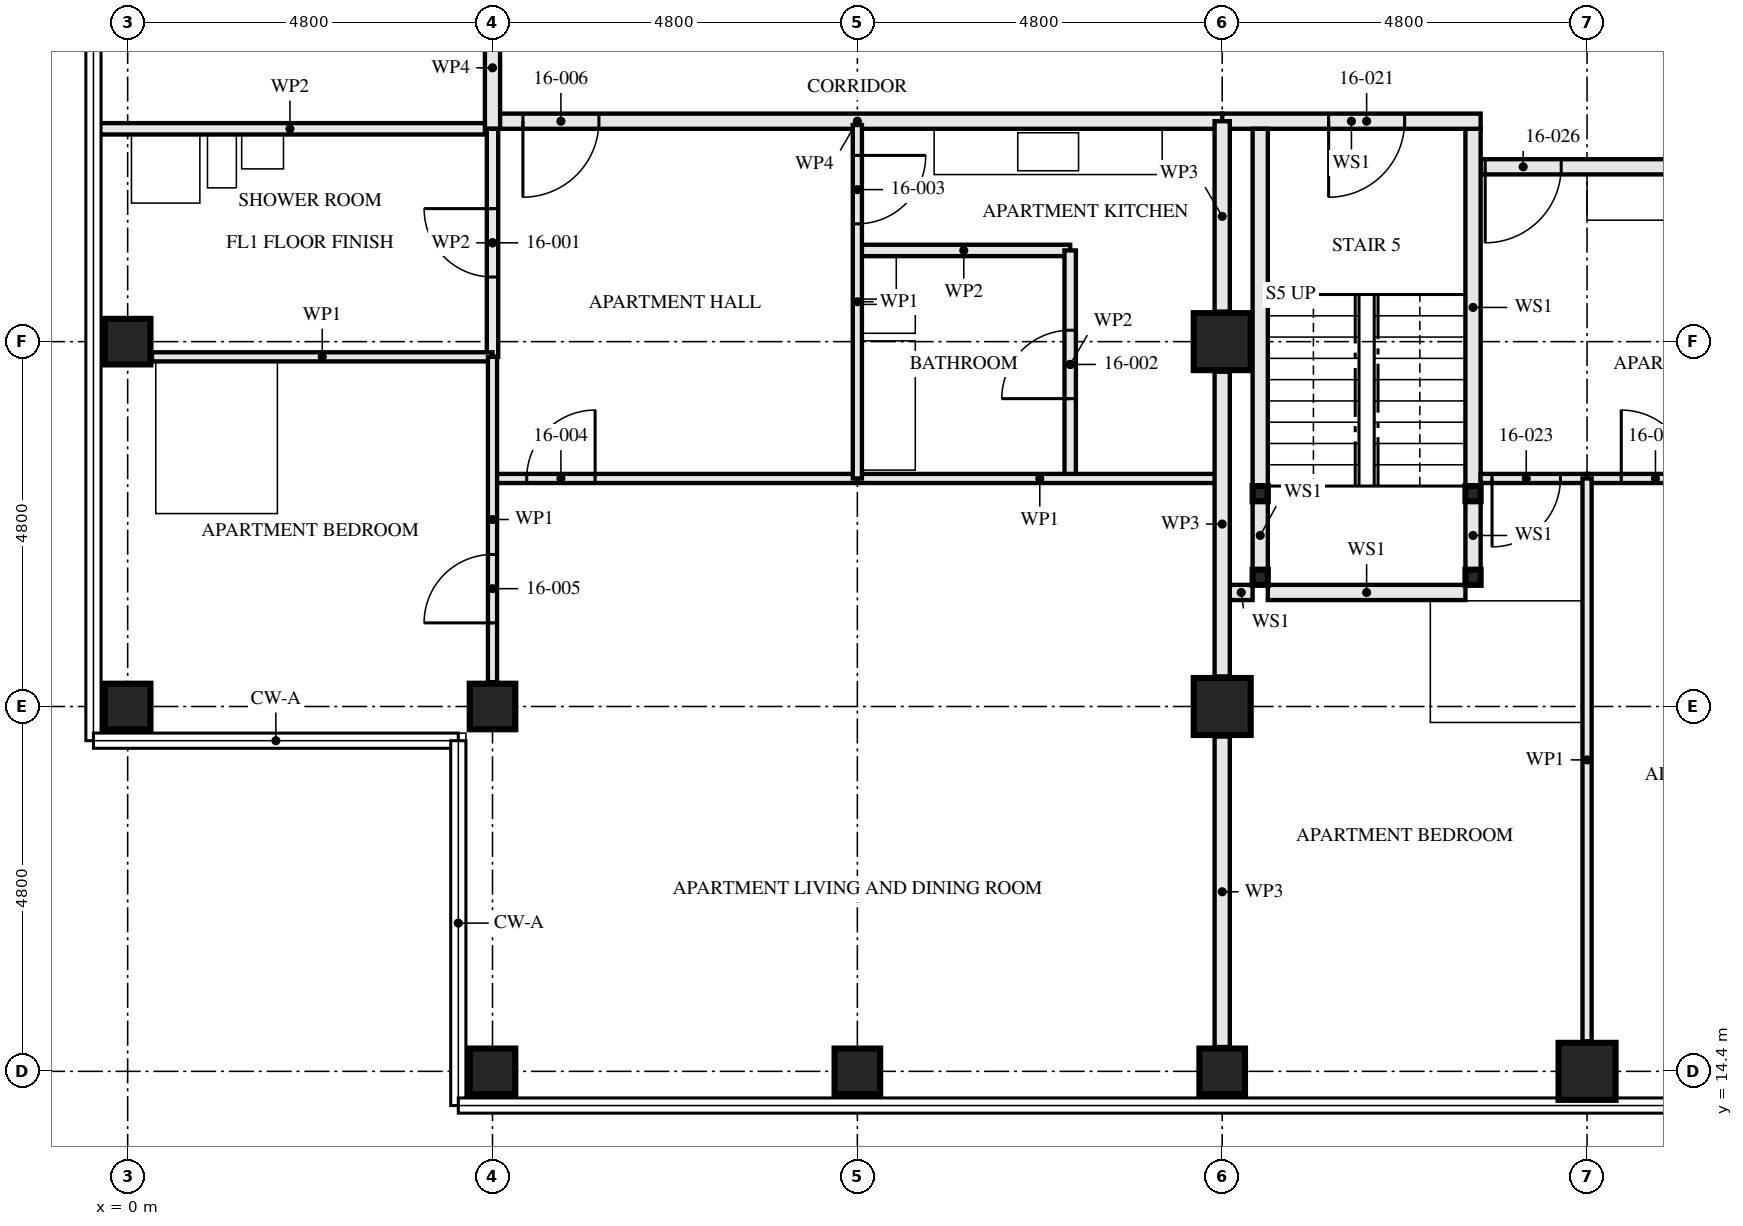
"""IFC4 building model, lengths in metres.
Left out: names, types, materials, properties, quantities, classifications, styles, units other than length and angle.
Written with IfcOpenShell. Run it as: python <this file> out.ifc"""

import sys

from ifc_helpers import new_model, si_unit, direction, frame, frame_2d, origin, origin_2d, place, context, subcontext, project, spatial, rectangle, hollow_rectangle, extrude, element, fill, save


model = new_model("IFC4")
c1 = context("Model", 3, precision=1e-05, world=origin(), true_north=direction((0.0, 1.0)))
c2 = subcontext(c1, "Body", "Model", "MODEL_VIEW")
j1 = project(units=[si_unit("LENGTHUNIT", "METRE"), si_unit("PLANEANGLEUNIT", "RADIAN")], contexts=[c1])
p1 = place(None, origin())
s1 = spatial("IfcSite", under=j1, at=p1, CompositionType="ELEMENT")
p2 = place(p1, origin())
s2 = spatial("IfcBuilding", under=s1, at=p2, CompositionType="ELEMENT")
p3 = place(p2, frame((0.0, 0.0, 62.0)))
s3 = spatial("IfcBuildingStorey", under=s2, at=p3, CompositionType="ELEMENT", Elevation=62.0)
for number, where, z_axis, x_axis in (
    (1, (0.0, 19.2, 0.0), (0.0, 0.0, 1.0), (0.0, 1.0, 0.0)),
    (2, (0.0, 24.0, 0.0), (0.0, 0.0, 1.0), (1.0, 0.0, 0.0)),
    (3, (4.8, 14.4, 0.0), (0.0, 0.0, 1.0), (0.0, 1.0, 0.0)),
    (4, (4.8, 19.2, 0.0), (0.0, 0.0, 1.0), (0.0, 1.0, 0.0)),
    (5, (9.6, 14.4, 0.0), (0.0, 0.0, 1.0), (0.0, 1.0, 0.0)),
    (6, (14.4, 14.4, 0.0), (0.0, 0.0, 1.0), (0.0, 1.0, 0.0)),
):
    element("IfcColumn", number, at=place(p3, frame(where, z_axis=z_axis, x_axis=x_axis)), inside=s3, PredefinedType="COLUMN", context=c2, shape_type="SweptSolid", body=[
        extrude(hollow_rectangle(XDim=0.6, YDim=0.6, WallThickness=0.08, at=origin_2d()), origin(), (0.0, 0.0, 1.0), 3.5),
    ])
for number, where, z_axis, x_axis in (
    (7, (14.4, 19.2, 0.0), (0.0, 0.0, 1.0), (1.0, 0.0, 0.0)),
    (8, (14.4, 24.0, 0.0), (0.0, 0.0, 1.0), (1.0, 0.0, 0.0)),
    (9, (19.2, 14.4, 0.0), (0.0, 0.0, 1.0), (0.0, 1.0, 0.0)),
):
    element("IfcColumn", number, at=place(p3, frame(where, z_axis=z_axis, x_axis=x_axis)), inside=s3, PredefinedType="COLUMN", context=c2, shape_type="SweptSolid", body=[
        extrude(hollow_rectangle(XDim=0.75, YDim=0.75, WallThickness=0.08, at=origin_2d()), origin(), (0.0, 0.0, 1.0), 3.5),
    ])
for number, where, z_axis, x_axis in (
    (10, (14.9, 20.9, 0.0), (0.0, 0.0, 1.0), (1.0, 0.0, 0.0)),
    (11, (17.7, 20.9, 0.0), (0.0, 0.0, 1.0), (1.0, 0.0, 0.0)),
    (12, (14.9, 22.0, 0.0), (0.0, 0.0, 1.0), (1.0, 0.0, 0.0)),
    (13, (17.7, 22.0, 0.0), (0.0, 0.0, 1.0), (1.0, 0.0, 0.0)),
):
    element("IfcColumn", number, at=place(p3, frame(where, z_axis=z_axis, x_axis=x_axis)), inside=s3, PredefinedType="COLUMN", context=c2, shape_type="SweptSolid", body=[
        extrude(hollow_rectangle(XDim=0.2, YDim=0.2, WallThickness=0.008, at=origin_2d()), origin(), (0.0, 0.0, 1.0), 3.33),
    ])
p4 = place(p3, frame((4.8, 23.8, 0.0), z_axis=(0.0, 0.0, 1.0), x_axis=(0.0, 1.0, 0.0)))
e14 = element("IfcWall", 14, at=p4, inside=s3, PredefinedType="PARTITIONING", context=c2, shape_type="SweptSolid", body=[
    extrude(rectangle(XDim=3.0, YDim=0.15, at=frame_2d((1.5, 0.0))), origin(), (0.0, 0.0, 1.0), 2.55),
])
p5 = place(p4, frame((1.05, 0.0, 0.0)))
e15 = element("IfcOpeningElement", 15, at=p5, cuts=e14, PredefinedType="OPENING", context=c2, shape_type="SweptSolid", body=[
    extrude(rectangle(XDim=0.9, YDim=2.1, at=frame_2d((0.45, 1.05))), frame((0.0, 0.085, 0.0), z_axis=(0.0, -1.0, 0.0), x_axis=(1.0, 0.0, 0.0)), (0.0, 0.0, 1.0), 0.171),
])
p6 = place(p3, frame((12.4, 22.2, 0.0), z_axis=(0.0, 0.0, 1.0), x_axis=(0.0, 1.0, 0.0)))
e16 = element("IfcWall", 16, at=p6, inside=s3, PredefinedType="PARTITIONING", context=c2, shape_type="SweptSolid", body=[
    extrude(rectangle(XDim=3.0, YDim=0.15, at=frame_2d((1.5, 0.0))), origin(), (0.0, 0.0, 1.0), 2.55),
])
p7 = place(p6, frame((1.05, 0.0, 0.0)))
e17 = element("IfcOpeningElement", 17, at=p7, cuts=e16, PredefinedType="OPENING", context=c2, shape_type="SweptSolid", body=[
    extrude(rectangle(XDim=0.9, YDim=2.1, at=frame_2d((0.45, 1.05))), frame((0.0, 0.085, 0.0), z_axis=(0.0, -1.0, 0.0), x_axis=(1.0, 0.0, 0.0)), (0.0, 0.0, 1.0), 0.171),
])
p8 = place(p3, frame((9.6, 25.2, 0.0), z_axis=(0.0, 0.0, 1.0), x_axis=(1.0, 0.0, 0.0)))
e18 = element("IfcWall", 18, at=p8, inside=s3, PredefinedType="PARTITIONING", context=c2, shape_type="SweptSolid", body=[
    extrude(rectangle(XDim=2.8, YDim=0.15, at=frame_2d((1.4, 0.0))), origin(), (0.0, 0.0, 1.0), 3.33),
])
p9 = place(p3, frame((9.6, 22.2, 0.0), z_axis=(0.0, 0.0, 1.0), x_axis=(0.0, 1.0, 0.0)))
e19 = element("IfcWall", 19, at=p9, inside=s3, PredefinedType="PARTITIONING", context=c2, shape_type="SweptSolid", body=[
    extrude(rectangle(XDim=4.65, YDim=0.12, at=frame_2d((2.325, 0.0))), origin(), (0.0, 0.0, 1.0), 2.55),
])
p10 = place(p9, frame((3.35, 0.0, 0.0)))
e20 = element("IfcOpeningElement", 20, at=p10, cuts=e19, PredefinedType="OPENING", context=c2, shape_type="SweptSolid", body=[
    extrude(rectangle(XDim=0.9, YDim=2.1, at=frame_2d((0.45, 1.05))), frame((0.0, 0.071, 0.0), z_axis=(0.0, -1.0, 0.0), x_axis=(1.0, 0.0, 0.0)), (0.0, 0.0, 1.0), 0.141),
])
p11 = place(p3, frame((0.32, 23.8, 0.0), z_axis=(0.0, 0.0, 1.0), x_axis=(1.0, 0.0, 0.0)))
e21 = element("IfcWall", 21, at=p11, inside=s3, PredefinedType="PARTITIONING", context=c2, shape_type="SweptSolid", body=[
    extrude(rectangle(XDim=4.48, YDim=0.12, at=frame_2d((2.24, 0.0))), origin(), (0.0, 0.0, 1.0), 3.33),
])
p12 = place(p3, frame((4.8, 22.2, 0.0), z_axis=(0.0, 0.0, 1.0), x_axis=(1.0, 0.0, 0.0)))
e22 = element("IfcWall", 22, at=p12, inside=s3, PredefinedType="PARTITIONING", context=c2, shape_type="SweptSolid", body=[
    extrude(rectangle(XDim=4.8, YDim=0.12, at=frame_2d((2.4, 0.0))), origin(), (0.0, 0.0, 1.0), 3.33),
])
p13 = place(p12, frame((0.45, 0.0, 0.0)))
e23 = element("IfcOpeningElement", 23, at=p13, cuts=e22, PredefinedType="OPENING", context=c2, shape_type="SweptSolid", body=[
    extrude(rectangle(XDim=0.9, YDim=2.1, at=frame_2d((0.45, 1.05))), frame((0.0, 0.071, 0.0), z_axis=(0.0, -1.0, 0.0), x_axis=(1.0, 0.0, 0.0)), (0.0, 0.0, 1.0), 0.141),
])
p14 = place(p3, frame((9.6, 22.2, 0.0), z_axis=(0.0, 0.0, 1.0), x_axis=(1.0, 0.0, 0.0)))
e24 = element("IfcWall", 24, at=p14, inside=s3, PredefinedType="PARTITIONING", context=c2, shape_type="SweptSolid", body=[
    extrude(rectangle(XDim=4.8, YDim=0.12, at=frame_2d((2.4, 0.0))), origin(), (0.0, 0.0, 1.0), 3.33),
])
p15 = place(p3, frame((4.8, 19.52, 0.0), z_axis=(0.0, 0.0, 1.0), x_axis=(0.0, 1.0, 0.0)))
e25 = element("IfcWall", 25, at=p15, inside=s3, PredefinedType="PARTITIONING", context=c2, shape_type="SweptSolid", body=[
    extrude(rectangle(XDim=4.28, YDim=0.12, at=frame_2d((2.14, 0.0))), origin(), (0.0, 0.0, 1.0), 3.33),
])
p16 = place(p15, frame((0.78, 0.0, 0.0)))
e26 = element("IfcOpeningElement", 26, at=p16, cuts=e25, PredefinedType="OPENING", context=c2, shape_type="SweptSolid", body=[
    extrude(rectangle(XDim=0.9, YDim=2.1, at=frame_2d((0.45, 1.05))), frame((0.0, 0.071, 0.0), z_axis=(0.0, -1.0, 0.0), x_axis=(1.0, 0.0, 0.0)), (0.0, 0.0, 1.0), 0.141),
])
p17 = place(p3, frame((4.8, 26.9, 0.0), z_axis=(0.0, 0.0, 1.0), x_axis=(1.0, 0.0, 0.0)))
e27 = element("IfcWall", 27, at=p17, inside=s3, PredefinedType="PARTITIONING", context=c2, shape_type="SweptSolid", body=[
    extrude(rectangle(XDim=9.6, YDim=0.2, at=frame_2d((4.8, 0.0))), origin(), (0.0, 0.0, 1.0), 3.33),
])
p18 = place(p17, frame((0.4, 0.0, 0.0)))
e28 = element("IfcOpeningElement", 28, at=p18, cuts=e27, PredefinedType="OPENING", context=c2, shape_type="SweptSolid", body=[
    extrude(rectangle(XDim=1.0, YDim=2.1, at=frame_2d((0.5, 1.05))), frame((0.0, 0.111, 0.0), z_axis=(0.0, -1.0, 0.0), x_axis=(1.0, 0.0, 0.0)), (0.0, 0.0, 1.0), 0.221),
])
p19 = place(p3, frame((4.8, 26.8, 0.0), z_axis=(0.0, 0.0, 1.0), x_axis=(0.0, 1.0, 0.0)))
e29 = element("IfcWall", 29, at=p19, inside=s3, PredefinedType="PARTITIONING", context=c2, shape_type="SweptSolid", body=[
    extrude(rectangle(XDim=1.605, YDim=0.2, at=frame_2d((0.802, 0.0))), origin(), (0.0, 0.0, 1.0), 3.33),
])
p20 = place(p3, frame((14.9, 21.0, 0.0), z_axis=(0.0, 0.0, 1.0), x_axis=(0.0, 1.0, 0.0)))
e30 = element("IfcWall", 30, at=p20, inside=s3, PredefinedType="SOLIDWALL", context=c2, shape_type="SweptSolid", body=[
    extrude(rectangle(XDim=0.9, YDim=0.2, at=frame_2d((0.45, 0.0))), origin(), (0.0, 0.0, 1.0), 2.99),
])
p21 = place(p3, frame((14.9, 22.1, 0.0), z_axis=(0.0, 0.0, 1.0), x_axis=(0.0, 1.0, 0.0)))
e31 = element("IfcWall", 31, at=p21, inside=s3, PredefinedType="SOLIDWALL", context=c2, shape_type="SweptSolid", body=[
    extrude(rectangle(XDim=4.7, YDim=0.2, at=frame_2d((2.35, 0.0))), origin(), (0.0, 0.0, 1.0), 2.99),
])
p22 = place(p3, frame((17.7, 21.0, 0.0), z_axis=(0.0, 0.0, 1.0), x_axis=(0.0, 1.0, 0.0)))
e32 = element("IfcWall", 32, at=p22, inside=s3, PredefinedType="SOLIDWALL", context=c2, shape_type="SweptSolid", body=[
    extrude(rectangle(XDim=0.9, YDim=0.2, at=frame_2d((0.45, 0.0))), origin(), (0.0, 0.0, 1.0), 2.99),
])
p23 = place(p3, frame((17.7, 22.1, 0.0), z_axis=(0.0, 0.0, 1.0), x_axis=(0.0, 1.0, 0.0)))
e33 = element("IfcWall", 33, at=p23, inside=s3, PredefinedType="SOLIDWALL", context=c2, shape_type="SweptSolid", body=[
    extrude(rectangle(XDim=4.7, YDim=0.2, at=frame_2d((2.35, 0.0))), origin(), (0.0, 0.0, 1.0), 2.99),
])
p24 = place(p3, frame((14.5, 20.7, 0.0), z_axis=(0.0, 0.0, 1.0), x_axis=(1.0, 0.0, 0.0)))
e34 = element("IfcWall", 34, at=p24, inside=s3, PredefinedType="SOLIDWALL", context=c2, shape_type="SweptSolid", body=[
    extrude(rectangle(XDim=0.3, YDim=0.2, at=frame_2d((0.15, 0.0))), origin(), (0.0, 0.0, 1.0), 3.33),
])
p25 = place(p3, frame((15.0, 20.7, 0.0), z_axis=(0.0, 0.0, 1.0), x_axis=(1.0, 0.0, 0.0)))
e35 = element("IfcWall", 35, at=p25, inside=s3, PredefinedType="SOLIDWALL", context=c2, shape_type="SweptSolid", body=[
    extrude(rectangle(XDim=2.6, YDim=0.2, at=frame_2d((1.3, 0.0))), origin(), (0.0, 0.0, 1.0), 3.33),
])
p26 = place(p3, frame((14.4, 26.9, 0.0), z_axis=(0.0, 0.0, 1.0), x_axis=(1.0, 0.0, 0.0)))
e36 = element("IfcWall", 36, at=p26, inside=s3, PredefinedType="SOLIDWALL", context=c2, shape_type="SweptSolid", body=[
    extrude(rectangle(XDim=3.4, YDim=0.2, at=frame_2d((1.7, 0.0))), origin(), (0.0, 0.0, 1.0), 3.33),
])
p27 = place(p26, frame((1.4, 0.0, 0.0)))
e37 = element("IfcOpeningElement", 37, at=p27, cuts=e36, PredefinedType="OPENING", context=c2, shape_type="SweptSolid", body=[
    extrude(rectangle(XDim=1.0, YDim=2.1, at=frame_2d((0.5, 1.05))), frame((0.0, 0.111, 0.0), z_axis=(0.0, -1.0, 0.0), x_axis=(1.0, 0.0, 0.0)), (0.0, 0.0, 1.0), 0.221),
])
p28 = place(p3, frame((17.8, 22.2, 0.0), z_axis=(0.0, 0.0, 1.0), x_axis=(1.0, 0.0, 0.0)))
e38 = element("IfcWall", 38, at=p28, inside=s3, PredefinedType="PARTITIONING", context=c2, shape_type="SweptSolid", body=[
    extrude(rectangle(XDim=1.4, YDim=0.12, at=frame_2d((0.7, 0.0))), origin(), (0.0, 0.0, 1.0), 3.33),
])
p29 = place(p28, frame((0.15, 0.0, 0.0)))
e39 = element("IfcOpeningElement", 39, at=p29, cuts=e38, PredefinedType="OPENING", context=c2, shape_type="SweptSolid", body=[
    extrude(rectangle(XDim=0.9, YDim=2.1, at=frame_2d((0.45, 1.05))), frame((0.0, 0.071, 0.0), z_axis=(0.0, -1.0, 0.0), x_axis=(1.0, 0.0, 0.0)), (0.0, 0.0, 1.0), 0.141),
])
p30 = place(p3, frame((19.2, 22.2, 0.0), z_axis=(0.0, 0.0, 1.0), x_axis=(1.0, 0.0, 0.0)))
e40 = element("IfcWall", 40, at=p30, inside=s3, PredefinedType="PARTITIONING", context=c2, shape_type="SweptSolid", body=[
    extrude(rectangle(XDim=4.8, YDim=0.12, at=frame_2d((2.4, 0.0))), origin(), (0.0, 0.0, 1.0), 3.33),
])
p31 = place(p30, frame((0.45, 0.0, 0.0)))
e41 = element("IfcOpeningElement", 41, at=p31, cuts=e40, PredefinedType="OPENING", context=c2, shape_type="SweptSolid", body=[
    extrude(rectangle(XDim=0.9, YDim=2.1, at=frame_2d((0.45, 1.05))), frame((0.0, 0.071, 0.0), z_axis=(0.0, -1.0, 0.0), x_axis=(1.0, 0.0, 0.0)), (0.0, 0.0, 1.0), 0.141),
])
p32 = place(p3, frame((19.2, 14.795, 0.0), z_axis=(0.0, 0.0, 1.0), x_axis=(0.0, 1.0, 0.0)))
e42 = element("IfcWall", 42, at=p32, inside=s3, PredefinedType="PARTITIONING", context=c2, shape_type="SweptSolid", body=[
    extrude(rectangle(XDim=7.405, YDim=0.12, at=frame_2d((3.703, 0.0))), origin(), (0.0, 0.0, 1.0), 2.55),
])
p33 = place(p3, frame((17.8, 26.3, 0.0), z_axis=(0.0, 0.0, 1.0), x_axis=(1.0, 0.0, 0.0)))
e43 = element("IfcWall", 43, at=p33, inside=s3, PredefinedType="PARTITIONING", context=c2, shape_type="SweptSolid", body=[
    extrude(rectangle(XDim=11.0, YDim=0.2, at=frame_2d((5.5, 0.0))), origin(), (0.0, 0.0, 1.0), 2.55),
])
p34 = place(p33, frame((0.06, 0.0, 0.0)))
e44 = element("IfcOpeningElement", 44, at=p34, cuts=e43, PredefinedType="OPENING", context=c2, shape_type="SweptSolid", body=[
    extrude(rectangle(XDim=1.0, YDim=2.1, at=frame_2d((0.5, 1.05))), frame((0.0, 0.111, 0.0), z_axis=(0.0, -1.0, 0.0), x_axis=(1.0, 0.0, 0.0)), (0.0, 0.0, 1.0), 0.221),
])
p35 = place(p3, frame((14.4, 14.72, 0.0), z_axis=(0.0, 0.0, 1.0), x_axis=(0.0, 1.0, 0.0)))
e45 = element("IfcWall", 45, at=p35, inside=s3, PredefinedType="PARTITIONING", context=c2, shape_type="SweptSolid", body=[
    extrude(rectangle(XDim=4.085, YDim=0.2, at=frame_2d((2.042, 0.0))), origin(), (0.0, 0.0, 1.0), 2.32),
])
p36 = place(p3, frame((14.4, 19.595, 0.0), z_axis=(0.0, 0.0, 1.0), x_axis=(0.0, 1.0, 0.0)))
e46 = element("IfcWall", 46, at=p36, inside=s3, PredefinedType="PARTITIONING", context=c2, shape_type="SweptSolid", body=[
    extrude(rectangle(XDim=4.01, YDim=0.2, at=frame_2d((2.005, 0.0))), origin(), (0.0, 0.0, 1.0), 2.32),
])
p37 = place(p3, frame((14.4, 24.395, 0.0), z_axis=(0.0, 0.0, 1.0), x_axis=(0.0, 1.0, 0.0)))
e47 = element("IfcWall", 47, at=p37, inside=s3, PredefinedType="PARTITIONING", context=c2, shape_type="SweptSolid", body=[
    extrude(rectangle(XDim=2.505, YDim=0.2, at=frame_2d((1.252, 0.0))), origin(), (0.0, 0.0, 1.0), 2.32),
])
p38 = place(p3, frame((-0.43, 26.8, 0.0), z_axis=(0.0, 0.0, 1.0), x_axis=(1.0, 0.0, 0.0)))
e48 = element("IfcWall", 48, at=p38, inside=s3, PredefinedType="PARTITIONING", context=c2, shape_type="SweptSolid", body=[
    extrude(rectangle(XDim=5.13, YDim=0.15, at=frame_2d((2.565, 0.0))), origin(), (0.0, 0.0, 1.0), 2.32),
])
p39 = place(p5, origin())
e49 = element("IfcDoor", 49, at=p39, inside=s3, OperationType="SINGLE_SWING_LEFT", PredefinedType="DOOR", context=c2, shape_type="SweptSolid", body=[
    extrude(rectangle(XDim=0.9, YDim=2.1, at=frame_2d((0.45, 1.05))), frame((0.0, 0.022, 0.0), z_axis=(0.0, -1.0, 0.0), x_axis=(1.0, 0.0, 0.0)), (0.0, 0.0, 1.0), 0.044),
])
fill(e15, e49)
p40 = place(p7, origin())
e50 = element("IfcDoor", 50, at=p40, inside=s3, OperationType="SINGLE_SWING_RIGHT", PredefinedType="DOOR", context=c2, shape_type="SweptSolid", body=[
    extrude(rectangle(XDim=0.9, YDim=2.1, at=frame_2d((0.45, 1.05))), frame((0.0, 0.022, 0.0), z_axis=(0.0, -1.0, 0.0), x_axis=(1.0, 0.0, 0.0)), (0.0, 0.0, 1.0), 0.044),
])
fill(e17, e50)
p41 = place(p10, frame((0.9, 0.0, 0.0), z_axis=(0.0, 0.0, 1.0), x_axis=(-1.0, 0.0, 0.0)))
e51 = element("IfcDoor", 51, at=p41, inside=s3, OperationType="SINGLE_SWING_RIGHT", PredefinedType="DOOR", context=c2, shape_type="SweptSolid", body=[
    extrude(rectangle(XDim=0.9, YDim=2.1, at=frame_2d((0.45, 1.05))), frame((0.0, 0.022, 0.0), z_axis=(0.0, -1.0, 0.0), x_axis=(1.0, 0.0, 0.0)), (0.0, 0.0, 1.0), 0.044),
])
fill(e20, e51)
p42 = place(p13, origin())
e52 = element("IfcDoor", 52, at=p42, inside=s3, OperationType="SINGLE_SWING_LEFT", PredefinedType="DOOR", context=c2, shape_type="SweptSolid", body=[
    extrude(rectangle(XDim=0.9, YDim=2.1, at=frame_2d((0.45, 1.05))), frame((0.0, 0.022, 0.0), z_axis=(0.0, -1.0, 0.0), x_axis=(1.0, 0.0, 0.0)), (0.0, 0.0, 1.0), 0.044),
])
fill(e23, e52)
p43 = place(p16, origin())
e53 = element("IfcDoor", 53, at=p43, inside=s3, OperationType="SINGLE_SWING_RIGHT", PredefinedType="DOOR", context=c2, shape_type="SweptSolid", body=[
    extrude(rectangle(XDim=0.9, YDim=2.1, at=frame_2d((0.45, 1.05))), frame((0.0, 0.022, 0.0), z_axis=(0.0, -1.0, 0.0), x_axis=(1.0, 0.0, 0.0)), (0.0, 0.0, 1.0), 0.044),
])
fill(e26, e53)
p44 = place(p18, frame((1.0, 0.0, 0.0), z_axis=(0.0, 0.0, 1.0), x_axis=(-1.0, 0.0, 0.0)))
e54 = element("IfcDoor", 54, at=p44, inside=s3, OperationType="SINGLE_SWING_LEFT", PredefinedType="DOOR", context=c2, shape_type="SweptSolid", body=[
    extrude(rectangle(XDim=1.0, YDim=2.1, at=frame_2d((0.5, 1.05))), frame((0.0, 0.027, 0.0), z_axis=(0.0, -1.0, 0.0), x_axis=(1.0, 0.0, 0.0)), (0.0, 0.0, 1.0), 0.054),
])
fill(e28, e54)
p45 = place(p27, frame((1.0, 0.0, 0.0), z_axis=(0.0, 0.0, 1.0), x_axis=(-1.0, 0.0, 0.0)))
e55 = element("IfcDoor", 55, at=p45, inside=s3, OperationType="SINGLE_SWING_LEFT", PredefinedType="DOOR", context=c2, shape_type="SweptSolid", body=[
    extrude(rectangle(XDim=1.0, YDim=2.1, at=frame_2d((0.5, 1.05))), frame((0.0, 0.032, 0.0), z_axis=(0.0, -1.0, 0.0), x_axis=(1.0, 0.0, 0.0)), (0.0, 0.0, 1.0), 0.064),
])
fill(e37, e55)
p46 = place(p29, frame((0.9, 0.0, 0.0), z_axis=(0.0, 0.0, 1.0), x_axis=(-1.0, 0.0, 0.0)))
e56 = element("IfcDoor", 56, at=p46, inside=s3, OperationType="SINGLE_SWING_LEFT", PredefinedType="DOOR", context=c2, shape_type="SweptSolid", body=[
    extrude(rectangle(XDim=0.9, YDim=2.1, at=frame_2d((0.45, 1.05))), frame((0.0, 0.022, 0.0), z_axis=(0.0, -1.0, 0.0), x_axis=(1.0, 0.0, 0.0)), (0.0, 0.0, 1.0), 0.044),
])
fill(e39, e56)
p47 = place(p31, origin())
e57 = element("IfcDoor", 57, at=p47, inside=s3, OperationType="SINGLE_SWING_RIGHT", PredefinedType="DOOR", context=c2, shape_type="SweptSolid", body=[
    extrude(rectangle(XDim=0.9, YDim=2.1, at=frame_2d((0.45, 1.05))), frame((0.0, 0.022, 0.0), z_axis=(0.0, -1.0, 0.0), x_axis=(1.0, 0.0, 0.0)), (0.0, 0.0, 1.0), 0.044),
])
fill(e41, e57)
p48 = place(p34, frame((1.0, 0.0, 0.0), z_axis=(0.0, 0.0, 1.0), x_axis=(-1.0, 0.0, 0.0)))
e58 = element("IfcDoor", 58, at=p48, inside=s3, OperationType="SINGLE_SWING_LEFT", PredefinedType="DOOR", context=c2, shape_type="SweptSolid", body=[
    extrude(rectangle(XDim=1.0, YDim=2.1, at=frame_2d((0.5, 1.05))), frame((0.0, 0.027, 0.0), z_axis=(0.0, -1.0, 0.0), x_axis=(1.0, 0.0, 0.0)), (0.0, 0.0, 1.0), 0.054),
])
fill(e44, e58)
save(model, sys.argv[1])
